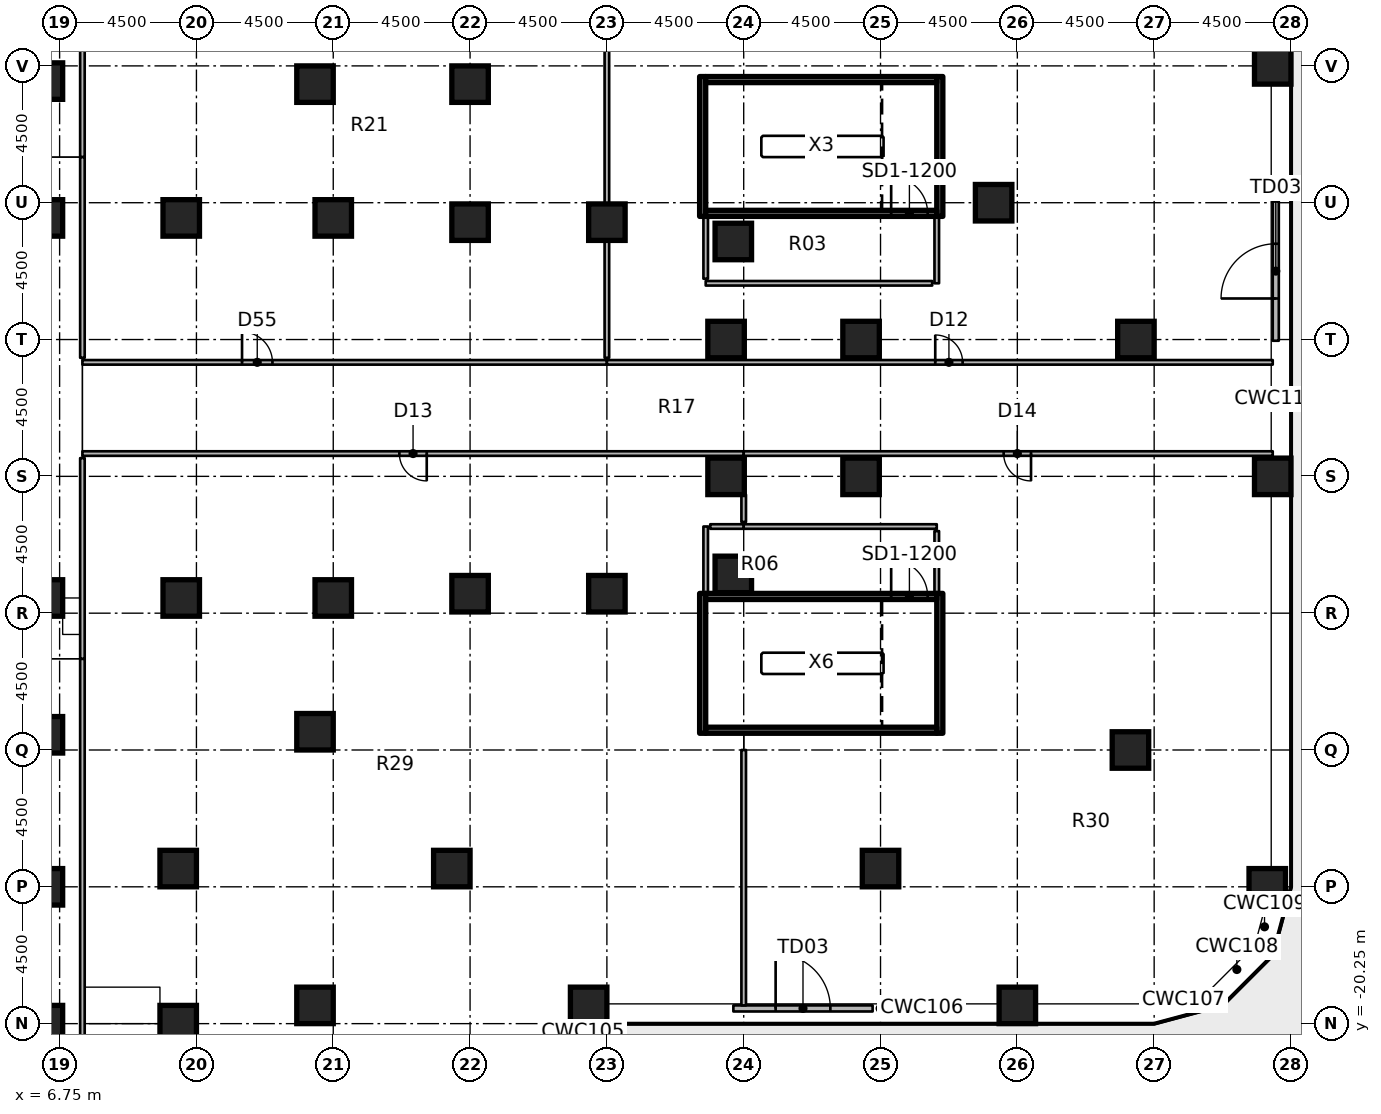
"""IFC4 building model, lengths in metres.
Left out: names, types, materials, properties, quantities, classifications, styles, units other than length and angle.
Written with IfcOpenShell. Run it as: python <this file> out.ifc"""

import sys

from ifc_helpers import new_model, si_unit, direction, frame, frame_2d, origin, origin_2d, place, context, subcontext, project, spatial, rectangle, extrude, element, fill, save


model = new_model("IFC4")
c1 = context("Model", 3, precision=1e-05, world=origin(), true_north=direction((0.0, 1.0)))
c2 = subcontext(c1, "Body", "Model", "MODEL_VIEW")
j1 = project(units=[si_unit("LENGTHUNIT", "METRE"), si_unit("PLANEANGLEUNIT", "RADIAN")], contexts=[c1])
p1 = place(None, origin())
s1 = spatial("IfcSite", under=j1, at=p1, CompositionType="ELEMENT")
p2 = place(p1, origin())
s2 = spatial("IfcBuilding", under=s1, at=p2, CompositionType="ELEMENT")
p3 = place(p2, frame((0.0, 0.0, 12.0)))
s3 = spatial("IfcBuildingStorey", under=s2, at=p3, CompositionType="ELEMENT", Elevation=12.0)
for number, where, z_axis, x_axis in (
    (1, (6.25, -20.25, 0.0), (0.0, 0.0, 1.0), (1.0, 0.0, 0.0)),
    (2, (6.25, -15.75, 0.0), (0.0, 0.0, 1.0), (1.0, 0.0, 0.0)),
    (3, (6.25, -10.75, 0.0), (0.0, 0.0, 1.0), (1.0, 0.0, 0.0)),
    (4, (6.25, -6.25, 0.0), (0.0, 0.0, 1.0), (1.0, 0.0, 0.0)),
    (5, (6.25, 6.25, 0.0), (0.0, 0.0, 1.0), (1.0, 0.0, 0.0)),
    (6, (6.25, 10.75, 0.0), (0.0, 0.0, 1.0), (1.0, 0.0, 0.0)),
    (7, (10.65, -20.25, 0.0), (0.0, 0.0, 1.0), (1.0, 0.0, 0.0)),
    (8, (10.65, -15.15, 0.0), (0.0, 0.0, 1.0), (1.0, 0.0, 0.0)),
    (9, (10.75, -6.25, 0.0), (0.0, 0.0, 1.0), (1.0, 0.0, 0.0)),
    (10, (10.75, 6.25, 0.0), (0.0, 0.0, 1.0), (1.0, 0.0, 0.0)),
    (11, (15.15, -19.65, 0.0), (0.0, 0.0, 1.0), (1.0, 0.0, 0.0)),
    (12, (15.15, -10.65, 0.0), (0.0, 0.0, 1.0), (1.0, 0.0, 0.0)),
    (13, (15.75, -6.25, 0.0), (0.0, 0.0, 1.0), (1.0, 0.0, 0.0)),
    (14, (15.75, 6.25, 0.0), (0.0, 0.0, 1.0), (1.0, 0.0, 0.0)),
    (15, (15.15, 10.65, 0.0), (0.0, 0.0, 1.0), (1.0, 0.0, 0.0)),
    (16, (19.65, -15.15, 0.0), (0.0, 0.0, 1.0), (1.0, 0.0, 0.0)),
    (17, (20.25, -6.11, 0.0), (0.0, 0.0, 1.0), (1.0, 0.0, 0.0)),
    (18, (20.25, 6.11, 0.0), (0.0, 0.0, 1.0), (1.0, 0.0, 0.0)),
    (19, (20.25, 10.65, 0.0), (0.0, 0.0, 1.0), (1.0, 0.0, 0.0)),
    (20, (24.15, -19.65, 0.0), (0.0, 0.0, 1.0), (1.0, 0.0, 0.0)),
    (21, (24.75, -6.11, 0.0), (0.0, 0.0, 1.0), (1.0, 0.0, 0.0)),
    (22, (24.75, 6.11, 0.0), (0.0, 0.0, 1.0), (1.0, 0.0, 0.0)),
    (23, (28.908, -5.475, 0.0), (0.0, 0.0, 1.0), (1.0, 0.0, 0.0)),
    (24, (28.67, -2.25, 0.0), (0.0, 0.0, 1.0), (1.0, 0.0, 0.0)),
    (25, (28.67, 2.25, 0.0), (0.0, 0.0, 1.0), (1.0, 0.0, 0.0)),
    (26, (28.908, 5.475, 0.0), (0.0, 0.0, 1.0), (1.0, 0.0, 0.0)),
    (27, (33.75, -15.15, 0.0), (0.0, 0.0, 1.0), (1.0, 0.0, 0.0)),
    (28, (33.11, -2.25, 0.0), (0.0, 0.0, 1.0), (1.0, 0.0, 0.0)),
    (29, (33.11, 2.25, 0.0), (0.0, 0.0, 1.0), (1.0, 0.0, 0.0)),
    (30, (38.25, -19.65, 0.0), (0.0, 0.0, 1.0), (1.0, 0.0, 0.0)),
    (31, (37.47, 6.75, 0.0), (0.0, 0.0, 1.0), (1.0, 0.0, 0.0)),
    (32, (41.97, -11.25, 0.0), (0.0, 0.0, 1.0), (1.0, 0.0, 0.0)),
    (33, (42.15, 2.25, 0.0), (0.0, 0.0, 1.0), (1.0, 0.0, 0.0)),
    (34, (46.47, -15.75, 0.0), (0.0, 0.0, 1.0), (1.0, 0.0, 0.0)),
    (35, (46.65, -2.25, 0.0), (0.0, 0.0, 1.0), (1.0, 0.0, 0.0)),
    (36, (46.65, 11.25, 0.0), (0.0, 0.0, 1.0), (1.0, 0.0, 0.0)),
):
    element("IfcColumn", number, at=place(p3, frame(where, z_axis=z_axis, x_axis=x_axis)), inside=s3, PredefinedType="COLUMN", context=c2, shape_type="SweptSolid", body=[
        extrude(rectangle(XDim=1.2, YDim=1.2, at=origin_2d()), origin(), (0.0, 0.0, 1.0), 4.55),
    ])
p4 = place(p3, frame((28.91, -19.75, 0.0), z_axis=(0.0, 0.0, 1.0), x_axis=(1.0, 0.0, 0.0)))
e37 = element("IfcWall", 37, at=p4, inside=s3, PredefinedType="SOLIDWALL", context=c2, shape_type="SweptSolid", body=[
    extrude(rectangle(XDim=4.58, YDim=0.2, at=frame_2d((2.29, 0.0))), origin(), (0.0, 0.0, 1.0), 4.55),
])
p5 = place(p4, frame((1.39, 0.0, 0.0)))
e38 = element("IfcOpeningElement", 38, at=p5, cuts=e37, PredefinedType="OPENING", context=c2, shape_type="SweptSolid", body=[
    extrude(rectangle(XDim=1.8, YDim=2.4, at=frame_2d((0.9, 1.2))), frame((0.0, 0.11, 0.0), z_axis=(0.0, -1.0, 0.0), x_axis=(1.0, 0.0, 0.0)), (0.0, 0.0, 1.0), 0.22),
])
p6 = place(p3, frame((46.75, 2.21, 0.0), z_axis=(0.0, 0.0, 1.0), x_axis=(0.0, 1.0, 0.0)))
e39 = element("IfcWall", 39, at=p6, inside=s3, PredefinedType="SOLIDWALL", context=c2, shape_type="SweptSolid", body=[
    extrude(rectangle(XDim=4.58, YDim=0.2, at=frame_2d((2.29, 0.0))), origin(), (0.0, 0.0, 1.0), 4.55),
])
p7 = place(p6, frame((1.39, 0.0, 0.0)))
e40 = element("IfcOpeningElement", 40, at=p7, cuts=e39, PredefinedType="OPENING", context=c2, shape_type="SweptSolid", body=[
    extrude(rectangle(XDim=1.8, YDim=2.4, at=frame_2d((0.9, 1.2))), frame((0.0, 0.11, 0.0), z_axis=(0.0, -1.0, 0.0), x_axis=(1.0, 0.0, 0.0)), (0.0, 0.0, 1.0), 0.22),
])
for number, where, z_axis, x_axis in (
    (41, (27.9, 6.3, 0.0), (0.0, 0.0, 1.0), (0.0, 1.0, 0.0)),
    (42, (35.7, 6.3, 0.0), (0.0, 0.0, 1.0), (0.0, 1.0, 0.0)),
):
    element("IfcWall", number, at=place(p3, frame(where, z_axis=z_axis, x_axis=x_axis)), inside=s3, PredefinedType="SHEAR", context=c2, shape_type="SweptSolid", body=[
        extrude(rectangle(XDim=4.6, YDim=0.2, at=frame_2d((2.3, 0.0))), origin(), (0.0, 0.0, 1.0), 4.55),
    ])
p8 = place(p3, frame((28.0, 6.4, 0.0), z_axis=(0.0, 0.0, 1.0), x_axis=(1.0, 0.0, 0.0)))
e43 = element("IfcWall", 43, at=p8, inside=s3, PredefinedType="SHEAR", context=c2, shape_type="SweptSolid", body=[
    extrude(rectangle(XDim=7.6, YDim=0.2, at=frame_2d((3.8, 0.0))), origin(), (0.0, 0.0, 1.0), 4.55),
])
p9 = place(p8, frame((6.1, 0.0, 0.0)))
e44 = element("IfcOpeningElement", 44, at=p9, cuts=e43, PredefinedType="OPENING", context=c2, shape_type="SweptSolid", body=[
    extrude(rectangle(XDim=1.2, YDim=2.1, at=frame_2d((0.6, 1.05))), frame((0.0, 0.11, 0.0), z_axis=(0.0, -1.0, 0.0), x_axis=(1.0, 0.0, 0.0)), (0.0, 0.0, 1.0), 0.22),
])
p10 = place(p3, frame((28.0, 10.8, 0.0), z_axis=(0.0, 0.0, 1.0), x_axis=(1.0, 0.0, 0.0)))
e45 = element("IfcWall", 45, at=p10, inside=s3, PredefinedType="SHEAR", context=c2, shape_type="SweptSolid", body=[
    extrude(rectangle(XDim=7.6, YDim=0.2, at=frame_2d((3.8, 0.0))), origin(), (0.0, 0.0, 1.0), 4.55),
])
for number, where, z_axis, x_axis in (
    (46, (27.9, -10.7, 0.0), (0.0, 0.0, 1.0), (0.0, 1.0, 0.0)),
    (47, (35.7, -10.7, 0.0), (0.0, 0.0, 1.0), (0.0, 1.0, 0.0)),
):
    element("IfcWall", number, at=place(p3, frame(where, z_axis=z_axis, x_axis=x_axis)), inside=s3, PredefinedType="SHEAR", context=c2, shape_type="SweptSolid", body=[
        extrude(rectangle(XDim=4.6, YDim=0.2, at=frame_2d((2.3, 0.0))), origin(), (0.0, 0.0, 1.0), 4.55),
    ])
p11 = place(p3, frame((28.0, -10.6, 0.0), z_axis=(0.0, 0.0, 1.0), x_axis=(1.0, 0.0, 0.0)))
e48 = element("IfcWall", 48, at=p11, inside=s3, PredefinedType="SHEAR", context=c2, shape_type="SweptSolid", body=[
    extrude(rectangle(XDim=7.6, YDim=0.2, at=frame_2d((3.8, 0.0))), origin(), (0.0, 0.0, 1.0), 4.55),
])
p12 = place(p3, frame((28.0, -6.2, 0.0), z_axis=(0.0, 0.0, 1.0), x_axis=(1.0, 0.0, 0.0)))
e49 = element("IfcWall", 49, at=p12, inside=s3, PredefinedType="SHEAR", context=c2, shape_type="SweptSolid", body=[
    extrude(rectangle(XDim=7.6, YDim=0.2, at=frame_2d((3.8, 0.0))), origin(), (0.0, 0.0, 1.0), 4.55),
])
p13 = place(p12, frame((6.1, 0.0, 0.0)))
e50 = element("IfcOpeningElement", 50, at=p13, cuts=e49, PredefinedType="OPENING", context=c2, shape_type="SweptSolid", body=[
    extrude(rectangle(XDim=1.2, YDim=2.1, at=frame_2d((0.6, 1.05))), frame((0.0, 0.11, 0.0), z_axis=(0.0, -1.0, 0.0), x_axis=(1.0, 0.0, 0.0)), (0.0, 0.0, 1.0), 0.22),
])
p14 = place(p3, frame((35.6, 6.3, 0.0), z_axis=(0.0, 0.0, 1.0), x_axis=(0.0, -1.0, 0.0)))
e51 = element("IfcWall", 51, at=p14, inside=s3, PredefinedType="PARTITIONING", context=c2, shape_type="SweptSolid", body=[
    extrude(rectangle(XDim=2.2, YDim=0.15, at=frame_2d((1.1, 0.0))), origin(), (0.0, 0.0, 1.0), 4.55),
])
p15 = place(p3, frame((35.45, 4.1, 0.0), z_axis=(0.0, 0.0, 1.0), x_axis=(-1.0, 0.0, 0.0)))
e52 = element("IfcWall", 52, at=p15, inside=s3, PredefinedType="PARTITIONING", context=c2, shape_type="SweptSolid", body=[
    extrude(rectangle(XDim=7.45, YDim=0.15, at=frame_2d((3.725, 0.0))), origin(), (0.0, 0.0, 1.0), 4.55),
])
p16 = place(p3, frame((28.0, 4.25, 0.0), z_axis=(0.0, 0.0, 1.0), x_axis=(0.0, 1.0, 0.0)))
e53 = element("IfcWall", 53, at=p16, inside=s3, PredefinedType="PARTITIONING", context=c2, shape_type="SweptSolid", body=[
    extrude(rectangle(XDim=2.05, YDim=0.15, at=frame_2d((1.025, 0.0))), origin(), (0.0, 0.0, 1.0), 4.55),
])
p17 = place(p3, frame((28.0, -6.1, 0.0), z_axis=(0.0, 0.0, 1.0), x_axis=(0.0, 1.0, 0.0)))
e54 = element("IfcWall", 54, at=p17, inside=s3, PredefinedType="PARTITIONING", context=c2, shape_type="SweptSolid", body=[
    extrude(rectangle(XDim=2.2, YDim=0.15, at=frame_2d((1.1, 0.0))), origin(), (0.0, 0.0, 1.0), 4.55),
])
p18 = place(p3, frame((28.15, -3.9, 0.0), z_axis=(0.0, 0.0, 1.0), x_axis=(1.0, 0.0, 0.0)))
e55 = element("IfcWall", 55, at=p18, inside=s3, PredefinedType="PARTITIONING", context=c2, shape_type="SweptSolid", body=[
    extrude(rectangle(XDim=1.1, YDim=0.15, at=frame_2d((0.55, 0.0))), origin(), (0.0, 0.0, 1.0), 4.55),
])
p19 = place(p3, frame((29.25, -3.9, 0.0), z_axis=(0.0, 0.0, 1.0), x_axis=(1.0, 0.0, 0.0)))
e56 = element("IfcWall", 56, at=p19, inside=s3, PredefinedType="PARTITIONING", context=c2, shape_type="SweptSolid", body=[
    extrude(rectangle(XDim=6.35, YDim=0.15, at=frame_2d((3.175, 0.0))), origin(), (0.0, 0.0, 1.0), 4.55),
])
p20 = place(p3, frame((35.6, -4.05, 0.0), z_axis=(0.0, 0.0, 1.0), x_axis=(0.0, -1.0, 0.0)))
e57 = element("IfcWall", 57, at=p20, inside=s3, PredefinedType="PARTITIONING", context=c2, shape_type="SweptSolid", body=[
    extrude(rectangle(XDim=2.05, YDim=0.15, at=frame_2d((1.025, 0.0))), origin(), (0.0, 0.0, 1.0), 4.55),
])
p21 = place(p3, frame((7.5, 24.75, 0.0), z_axis=(0.0, 0.0, 1.0), x_axis=(0.0, -1.0, 0.0)))
e58 = element("IfcWall", 58, at=p21, inside=s3, PredefinedType="PARTITIONING", context=c2, shape_type="SweptSolid", body=[
    extrude(rectangle(XDim=16.5, YDim=0.15, at=frame_2d((8.25, 0.0))), origin(), (0.0, 0.0, 1.0), 4.55),
])
p22 = place(p21, frame((10.5, 0.0, 0.0)))
e59 = element("IfcOpeningElement", 59, at=p22, cuts=e58, PredefinedType="OPENING", context=c2, shape_type="SweptSolid", body=[
    extrude(rectangle(XDim=1.0, YDim=2.1, at=frame_2d((0.5, 1.05))), frame((0.0, 0.085, 0.0), z_axis=(0.0, -1.0, 0.0), x_axis=(1.0, 0.0, 0.0)), (0.0, 0.0, 1.0), 0.17),
])
p23 = place(p3, frame((7.5, -8.25, 0.0), z_axis=(0.0, 0.0, 1.0), x_axis=(0.0, -1.0, 0.0)))
e60 = element("IfcWall", 60, at=p23, inside=s3, PredefinedType="PARTITIONING", context=c2, shape_type="SweptSolid", body=[
    extrude(rectangle(XDim=16.5, YDim=0.15, at=frame_2d((8.25, 0.0))), origin(), (0.0, 0.0, 1.0), 4.55),
])
p24 = place(p3, frame((7.5, 1.5, 0.0), z_axis=(0.0, 0.0, 1.0), x_axis=(1.0, 0.0, 0.0)))
e61 = element("IfcWall", 61, at=p24, inside=s3, PredefinedType="PARTITIONING", context=c2, shape_type="SweptSolid", body=[
    extrude(rectangle(XDim=17.25, YDim=0.15, at=frame_2d((8.625, 0.0))), origin(), (0.0, 0.0, 1.0), 4.55),
])
p25 = place(p24, frame((5.25, 0.0, 0.0)))
e62 = element("IfcOpeningElement", 62, at=p25, cuts=e61, PredefinedType="OPENING", context=c2, shape_type="SweptSolid", body=[
    extrude(rectangle(XDim=1.0, YDim=2.1, at=frame_2d((0.5, 1.05))), frame((0.0, 0.085, 0.0), z_axis=(0.0, -1.0, 0.0), x_axis=(1.0, 0.0, 0.0)), (0.0, 0.0, 1.0), 0.17),
])
p26 = place(p3, frame((24.75, 1.5, 0.0), z_axis=(0.0, 0.0, 1.0), x_axis=(1.0, 0.0, 0.0)))
e63 = element("IfcWall", 63, at=p26, inside=s3, PredefinedType="PARTITIONING", context=c2, shape_type="SweptSolid", body=[
    extrude(rectangle(XDim=21.9, YDim=0.15, at=frame_2d((10.95, 0.0))), origin(), (0.0, 0.0, 1.0), 4.55),
])
p27 = place(p26, frame((10.8, 0.0, 0.0)))
e64 = element("IfcOpeningElement", 64, at=p27, cuts=e63, PredefinedType="OPENING", context=c2, shape_type="SweptSolid", body=[
    extrude(rectangle(XDim=0.9, YDim=2.1, at=frame_2d((0.45, 1.05))), frame((0.0, 0.085, 0.0), z_axis=(0.0, -1.0, 0.0), x_axis=(1.0, 0.0, 0.0)), (0.0, 0.0, 1.0), 0.17),
])
p28 = place(p3, frame((29.25, -1.5, 0.0), z_axis=(0.0, 0.0, 1.0), x_axis=(-1.0, 0.0, 0.0)))
e65 = element("IfcWall", 65, at=p28, inside=s3, PredefinedType="PARTITIONING", context=c2, shape_type="SweptSolid", body=[
    extrude(rectangle(XDim=21.75, YDim=0.15, at=frame_2d((10.875, 0.0))), origin(), (0.0, 0.0, 1.0), 4.55),
])
p29 = place(p28, frame((10.425, 0.0, 0.0)))
e66 = element("IfcOpeningElement", 66, at=p29, cuts=e65, PredefinedType="OPENING", context=c2, shape_type="SweptSolid", body=[
    extrude(rectangle(XDim=0.9, YDim=2.1, at=frame_2d((0.45, 1.05))), frame((0.0, 0.085, 0.0), z_axis=(0.0, -1.0, 0.0), x_axis=(1.0, 0.0, 0.0)), (0.0, 0.0, 1.0), 0.17),
])
p30 = place(p3, frame((46.65, -1.5, 0.0), z_axis=(0.0, 0.0, 1.0), x_axis=(-1.0, 0.0, 0.0)))
e67 = element("IfcWall", 67, at=p30, inside=s3, PredefinedType="PARTITIONING", context=c2, shape_type="SweptSolid", body=[
    extrude(rectangle(XDim=17.4, YDim=0.15, at=frame_2d((8.7, 0.0))), origin(), (0.0, 0.0, 1.0), 4.55),
])
p31 = place(p30, frame((7.95, 0.0, 0.0)))
e68 = element("IfcOpeningElement", 68, at=p31, cuts=e67, PredefinedType="OPENING", context=c2, shape_type="SweptSolid", body=[
    extrude(rectangle(XDim=0.9, YDim=2.1, at=frame_2d((0.45, 1.05))), frame((0.0, 0.085, 0.0), z_axis=(0.0, -1.0, 0.0), x_axis=(1.0, 0.0, 0.0)), (0.0, 0.0, 1.0), 0.17),
])
p32 = place(p3, frame((24.75, 19.05, 0.0), z_axis=(0.0, 0.0, 1.0), x_axis=(0.0, -1.0, 0.0)))
e69 = element("IfcWall", 69, at=p32, inside=s3, PredefinedType="PARTITIONING", context=c2, shape_type="SweptSolid", body=[
    extrude(rectangle(XDim=12.34, YDim=0.15, at=frame_2d((6.17, 0.0))), origin(), (0.0, 0.0, 1.0), 4.55),
])
p33 = place(p3, frame((24.75, 5.51, 0.0), z_axis=(0.0, 0.0, 1.0), x_axis=(0.0, -1.0, 0.0)))
e70 = element("IfcWall", 70, at=p33, inside=s3, PredefinedType="PARTITIONING", context=c2, shape_type="SweptSolid", body=[
    extrude(rectangle(XDim=3.86, YDim=0.15, at=frame_2d((1.93, 0.0))), origin(), (0.0, 0.0, 1.0), 4.55),
])
p34 = place(p3, frame((7.5, 1.65, 0.0), z_axis=(0.0, 0.0, 1.0), x_axis=(0.0, 1.0, 0.0)))
e71 = element("IfcWall", 71, at=p34, inside=s3, PredefinedType="PARTITIONING", context=c2, shape_type="SweptSolid", body=[
    extrude(rectangle(XDim=6.6, YDim=0.15, at=frame_2d((3.3, 0.0))), origin(), (0.0, 0.0, 1.0), 4.55),
])
p35 = place(p3, frame((29.25, -11.25, 0.0), z_axis=(0.0, 0.0, 1.0), x_axis=(0.0, -1.0, 0.0)))
e72 = element("IfcWall", 72, at=p35, inside=s3, PredefinedType="PARTITIONING", context=c2, shape_type="SweptSolid", body=[
    extrude(rectangle(XDim=8.4, YDim=0.15, at=frame_2d((4.2, 0.0))), origin(), (0.0, 0.0, 1.0), 4.55),
])
p36 = place(p3, frame((29.25, -2.85, 0.0), z_axis=(0.0, 0.0, 1.0), x_axis=(0.0, -1.0, 0.0)))
e73 = element("IfcWall", 73, at=p36, inside=s3, PredefinedType="PARTITIONING", context=c2, shape_type="SweptSolid", body=[
    extrude(rectangle(XDim=0.9, YDim=0.15, at=frame_2d((0.45, 0.0))), origin(), (0.0, 0.0, 1.0), 4.55),
])
p37 = place(p3, frame((7.5, -8.25, 0.0), z_axis=(0.0, 0.0, 1.0), x_axis=(0.0, 1.0, 0.0)))
e74 = element("IfcWall", 74, at=p37, inside=s3, PredefinedType="PARTITIONING", context=c2, shape_type="SweptSolid", body=[
    extrude(rectangle(XDim=6.6, YDim=0.15, at=frame_2d((3.3, 0.0))), origin(), (0.0, 0.0, 1.0), 4.55),
])
p38 = place(p5, origin())
e75 = element("IfcDoor", 75, at=p38, inside=s3, OperationType="SINGLE_SWING_LEFT", PredefinedType="DOOR", context=c2, shape_type="SweptSolid", body=[
    extrude(rectangle(XDim=1.8, YDim=2.4, at=frame_2d((0.9, 1.2))), frame((0.0, 0.025, 0.0), z_axis=(0.0, -1.0, 0.0), x_axis=(1.0, 0.0, 0.0)), (0.0, 0.0, 1.0), 0.05),
])
fill(e38, e75)
p39 = place(p7, origin())
e76 = element("IfcDoor", 76, at=p39, inside=s3, OperationType="SINGLE_SWING_LEFT", PredefinedType="DOOR", context=c2, shape_type="SweptSolid", body=[
    extrude(rectangle(XDim=1.8, YDim=2.4, at=frame_2d((0.9, 1.2))), frame((0.0, 0.025, 0.0), z_axis=(0.0, -1.0, 0.0), x_axis=(1.0, 0.0, 0.0)), (0.0, 0.0, 1.0), 0.05),
])
fill(e40, e76)
p40 = place(p9, origin())
e77 = element("IfcDoor", 77, at=p40, inside=s3, OperationType="SINGLE_SWING_RIGHT", PredefinedType="DOOR", context=c2, shape_type="SweptSolid", body=[
    extrude(rectangle(XDim=1.2, YDim=2.1, at=frame_2d((0.6, 1.05))), frame((0.0, 0.025, 0.0), z_axis=(0.0, -1.0, 0.0), x_axis=(1.0, 0.0, 0.0)), (0.0, 0.0, 1.0), 0.05),
])
fill(e44, e77)
p41 = place(p13, origin())
e78 = element("IfcDoor", 78, at=p41, inside=s3, OperationType="SINGLE_SWING_RIGHT", PredefinedType="DOOR", context=c2, shape_type="SweptSolid", body=[
    extrude(rectangle(XDim=1.2, YDim=2.1, at=frame_2d((0.6, 1.05))), frame((0.0, 0.025, 0.0), z_axis=(0.0, -1.0, 0.0), x_axis=(1.0, 0.0, 0.0)), (0.0, 0.0, 1.0), 0.05),
])
fill(e50, e78)
p42 = place(p25, origin())
e79 = element("IfcDoor", 79, at=p42, inside=s3, OperationType="SINGLE_SWING_LEFT", PredefinedType="DOOR", context=c2, shape_type="SweptSolid", body=[
    extrude(rectangle(XDim=1.0, YDim=2.1, at=frame_2d((0.5, 1.05))), frame((0.0, 0.025, 0.0), z_axis=(0.0, -1.0, 0.0), x_axis=(1.0, 0.0, 0.0)), (0.0, 0.0, 1.0), 0.05),
])
fill(e62, e79)
p43 = place(p27, origin())
e80 = element("IfcDoor", 80, at=p43, inside=s3, OperationType="SINGLE_SWING_LEFT", PredefinedType="DOOR", context=c2, shape_type="SweptSolid", body=[
    extrude(rectangle(XDim=0.9, YDim=2.1, at=frame_2d((0.45, 1.05))), frame((0.0, 0.025, 0.0), z_axis=(0.0, -1.0, 0.0), x_axis=(1.0, 0.0, 0.0)), (0.0, 0.0, 1.0), 0.05),
])
fill(e64, e80)
p44 = place(p29, origin())
e81 = element("IfcDoor", 81, at=p44, inside=s3, OperationType="SINGLE_SWING_LEFT", PredefinedType="DOOR", context=c2, shape_type="SweptSolid", body=[
    extrude(rectangle(XDim=0.9, YDim=2.1, at=frame_2d((0.45, 1.05))), frame((0.0, 0.025, 0.0), z_axis=(0.0, -1.0, 0.0), x_axis=(1.0, 0.0, 0.0)), (0.0, 0.0, 1.0), 0.05),
])
fill(e66, e81)
p45 = place(p31, origin())
e82 = element("IfcDoor", 82, at=p45, inside=s3, OperationType="SINGLE_SWING_LEFT", PredefinedType="DOOR", context=c2, shape_type="SweptSolid", body=[
    extrude(rectangle(XDim=0.9, YDim=2.1, at=frame_2d((0.45, 1.05))), frame((0.0, 0.025, 0.0), z_axis=(0.0, -1.0, 0.0), x_axis=(1.0, 0.0, 0.0)), (0.0, 0.0, 1.0), 0.05),
])
fill(e68, e82)
save(model, sys.argv[1])
